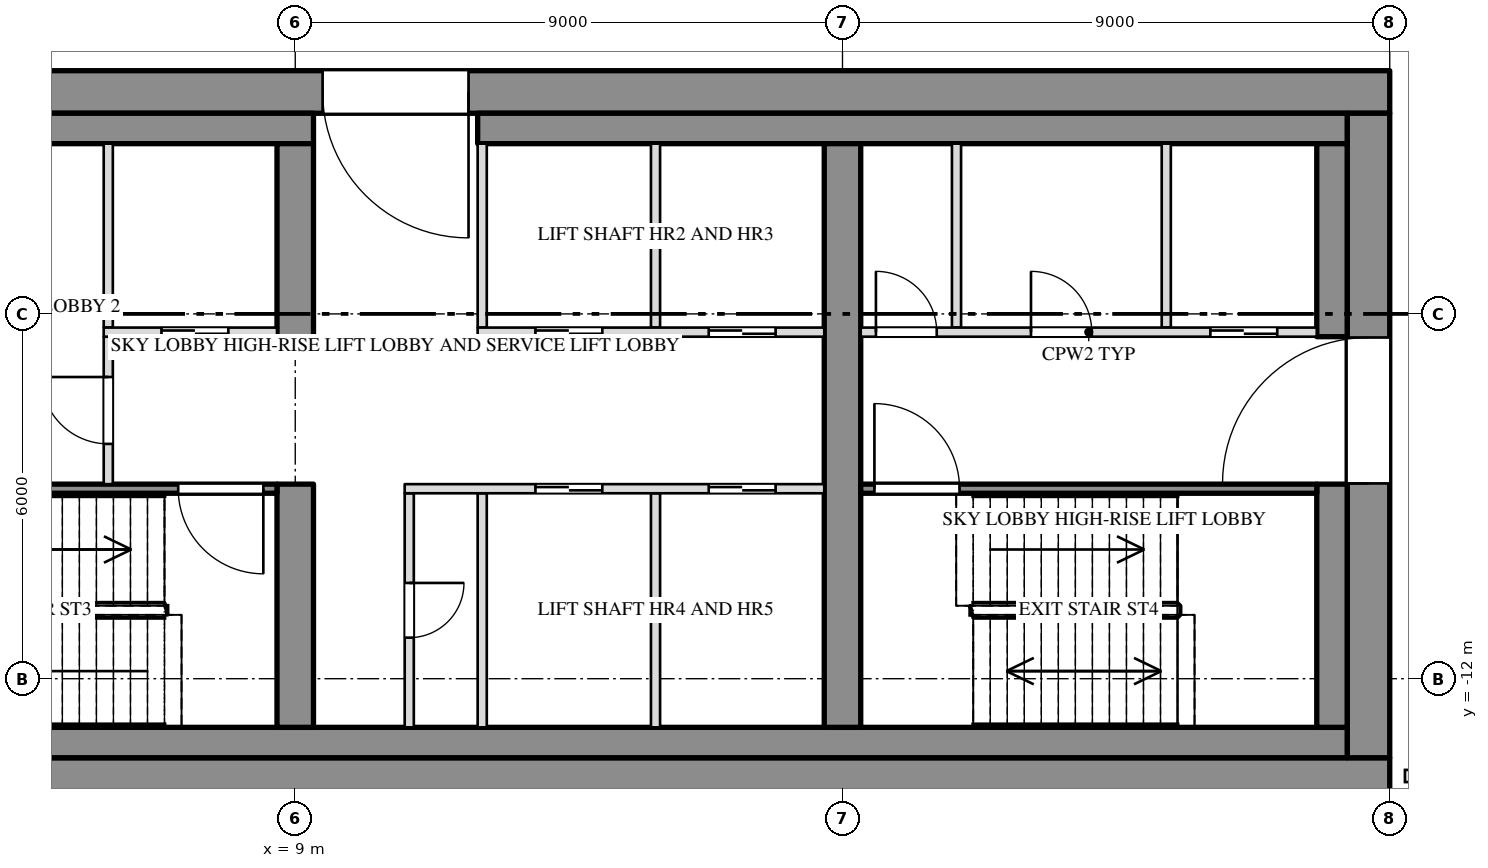
"""IFC4 building model, lengths in metres.
Left out: names, types, materials, properties, quantities, classifications, styles, units other than length and angle.
Written with IfcOpenShell. Run it as: python <this file> out.ifc"""

import sys

from ifc_helpers import new_model, si_unit, direction, frame, frame_2d, origin, place, context, subcontext, project, spatial, rectangle, extrude, element, fill, save


model = new_model("IFC4")
c1 = context("Model", 3, precision=1e-05, world=origin(), true_north=direction((0.0, 1.0)))
c2 = subcontext(c1, "Body", "Model", "MODEL_VIEW")
j1 = project(units=[si_unit("LENGTHUNIT", "METRE"), si_unit("PLANEANGLEUNIT", "RADIAN")], contexts=[c1])
p1 = place(None, origin())
s1 = spatial("IfcSite", under=j1, at=p1, CompositionType="ELEMENT")
p2 = place(p1, origin())
s2 = spatial("IfcBuilding", under=s1, at=p2, CompositionType="ELEMENT")
p3 = place(p2, frame((0.0, 0.0, 264.5)))
s3 = spatial("IfcBuildingStorey", under=s2, at=p3, CompositionType="ELEMENT", Elevation=264.5)
p4 = place(p3, frame((-27.0, -2.35, 0.0), z_axis=(0.0, 0.0, 1.0), x_axis=(1.0, 0.0, 0.0)))
e1 = element("IfcWall", 1, at=p4, inside=s3, PredefinedType="SHEAR", context=c2, shape_type="SweptSolid", body=[
    extrude(rectangle(XDim=54.0, YDim=0.7, at=frame_2d((27.0, 0.0))), origin(), (0.0, 0.0, 1.0), 3.65),
])
p5 = place(p4, frame((15.15, 0.0, 0.0)))
e2 = element("IfcOpeningElement", 2, at=p5, cuts=e1, PredefinedType="OPENING", context=c2, shape_type="SweptSolid", body=[
    extrude(rectangle(XDim=2.4, YDim=2.1, at=frame_2d((1.2, 1.05))), frame((0.0, 0.362, 0.0), z_axis=(0.0, -1.0, 0.0), x_axis=(1.0, 0.0, 0.0)), (0.0, 0.0, 1.0), 0.724),
])
p6 = place(p4, frame((36.45, 0.0, 0.0)))
e3 = element("IfcOpeningElement", 3, at=p6, cuts=e1, PredefinedType="OPENING", context=c2, shape_type="SweptSolid", body=[
    extrude(rectangle(XDim=2.4, YDim=2.1, at=frame_2d((1.2, 1.05))), frame((0.0, 0.362, 0.0), z_axis=(0.0, -1.0, 0.0), x_axis=(1.0, 0.0, 0.0)), (0.0, 0.0, 1.0), 0.724),
])
p7 = place(p3, frame((-27.0, -13.65, 0.0), z_axis=(0.0, 0.0, 1.0), x_axis=(1.0, 0.0, 0.0)))
e4 = element("IfcWall", 4, at=p7, inside=s3, PredefinedType="SHEAR", context=c2, shape_type="SweptSolid", body=[
    extrude(rectangle(XDim=54.0, YDim=0.7, at=frame_2d((27.0, 0.0))), origin(), (0.0, 0.0, 1.0), 3.65),
])
p8 = place(p3, frame((26.65, -13.3, 0.0), z_axis=(0.0, 0.0, 1.0), x_axis=(0.0, 1.0, 0.0)))
e5 = element("IfcWall", 5, at=p8, inside=s3, PredefinedType="SHEAR", context=c2, shape_type="SweptSolid", body=[
    extrude(rectangle(XDim=10.6, YDim=0.7, at=frame_2d((5.3, 0.0))), origin(), (0.0, 0.0, 1.0), 3.65),
])
p9 = place(p8, frame((4.512, 0.0, 0.0)))
e6 = element("IfcOpeningElement", 6, at=p9, cuts=e5, PredefinedType="OPENING", context=c2, shape_type="SweptSolid", body=[
    extrude(rectangle(XDim=2.4, YDim=2.1, at=frame_2d((1.2, 1.05))), frame((0.0, 0.362, 0.0), z_axis=(0.0, -1.0, 0.0), x_axis=(1.0, 0.0, 0.0)), (0.0, 0.0, 1.0), 0.724),
])
p10 = place(p3, frame((-9.3, -2.95, 0.0), z_axis=(0.0, 0.0, 1.0), x_axis=(1.0, 0.0, 0.0)))
e7 = element("IfcWall", 7, at=p10, inside=s3, PredefinedType="SHEAR", context=c2, shape_type="SweptSolid", body=[
    extrude(rectangle(XDim=18.6, YDim=0.5, at=frame_2d((9.3, 0.0))), origin(), (0.0, 0.0, 1.0), 3.65),
])
p11 = place(p3, frame((12.0, -2.95, 0.0), z_axis=(0.0, 0.0, 1.0), x_axis=(1.0, 0.0, 0.0)))
e8 = element("IfcWall", 8, at=p11, inside=s3, PredefinedType="SHEAR", context=c2, shape_type="SweptSolid", body=[
    extrude(rectangle(XDim=14.3, YDim=0.5, at=frame_2d((7.15, 0.0))), origin(), (0.0, 0.0, 1.0), 3.65),
])
p12 = place(p3, frame((-26.3, -13.05, 0.0), z_axis=(0.0, 0.0, 1.0), x_axis=(1.0, 0.0, 0.0)))
e9 = element("IfcWall", 9, at=p12, inside=s3, PredefinedType="SHEAR", context=c2, shape_type="SweptSolid", body=[
    extrude(rectangle(XDim=52.6, YDim=0.5, at=frame_2d((26.3, 0.0))), origin(), (0.0, 0.0, 1.0), 3.65),
])
p13 = place(p3, frame((26.05, -12.8, 0.0), z_axis=(0.0, 0.0, 1.0), x_axis=(0.0, 1.0, 0.0)))
e10 = element("IfcWall", 10, at=p13, inside=s3, PredefinedType="SHEAR", context=c2, shape_type="SweptSolid", body=[
    extrude(rectangle(XDim=4.0, YDim=0.5, at=frame_2d((2.0, 0.0))), origin(), (0.0, 0.0, 1.0), 3.65),
])
p14 = place(p3, frame((26.05, -6.375, 0.0), z_axis=(0.0, 0.0, 1.0), x_axis=(0.0, 1.0, 0.0)))
e11 = element("IfcWall", 11, at=p14, inside=s3, PredefinedType="SHEAR", context=c2, shape_type="SweptSolid", body=[
    extrude(rectangle(XDim=3.175, YDim=0.5, at=frame_2d((1.587, 0.0))), origin(), (0.0, 0.0, 1.0), 3.65),
])
p15 = place(p3, frame((9.0, -12.8, 0.0), z_axis=(0.0, 0.0, 1.0), x_axis=(0.0, 1.0, 0.0)))
e12 = element("IfcWall", 12, at=p15, inside=s3, PredefinedType="SHEAR", context=c2, shape_type="SweptSolid", body=[
    extrude(rectangle(XDim=4.0, YDim=0.6, at=frame_2d((2.0, 0.0))), origin(), (0.0, 0.0, 1.0), 3.65),
])
p16 = place(p3, frame((9.0, -6.375, 0.0), z_axis=(0.0, 0.0, 1.0), x_axis=(0.0, 1.0, 0.0)))
e13 = element("IfcWall", 13, at=p16, inside=s3, PredefinedType="SHEAR", context=c2, shape_type="SweptSolid", body=[
    extrude(rectangle(XDim=3.175, YDim=0.6, at=frame_2d((1.587, 0.0))), origin(), (0.0, 0.0, 1.0), 3.65),
])
p17 = place(p3, frame((18.0, -12.8, 0.0), z_axis=(0.0, 0.0, 1.0), x_axis=(0.0, 1.0, 0.0)))
e14 = element("IfcWall", 14, at=p17, inside=s3, PredefinedType="SHEAR", context=c2, shape_type="SweptSolid", body=[
    extrude(rectangle(XDim=9.6, YDim=0.6, at=frame_2d((4.8, 0.0))), origin(), (0.0, 0.0, 1.0), 3.65),
])
for number, where, z_axis, x_axis in (
    (15, (5.925, -6.225, 0.0), (0.0, 0.0, 1.0), (0.0, 1.0, 0.0)),
    (16, (12.075, -6.225, 0.0), (0.0, 0.0, 1.0), (0.0, 1.0, 0.0)),
    (17, (14.925, -6.225, 0.0), (0.0, 0.0, 1.0), (0.0, 1.0, 0.0)),
    (18, (19.875, -6.225, 0.0), (0.0, 0.0, 1.0), (0.0, 1.0, 0.0)),
    (19, (23.325, -6.225, 0.0), (0.0, 0.0, 1.0), (0.0, 1.0, 0.0)),
):
    element("IfcWall", number, at=place(p3, frame(where, z_axis=z_axis, x_axis=x_axis)), inside=s3, PredefinedType="PARTITIONING", context=c2, shape_type="SweptSolid", body=[
        extrude(rectangle(XDim=3.025, YDim=0.15, at=frame_2d((1.513, 0.0))), origin(), (0.0, 0.0, 1.0), 3.65),
    ])
p18 = place(p3, frame((10.875, -12.8, 0.0), z_axis=(0.0, 0.0, 1.0), x_axis=(0.0, 1.0, 0.0)))
e20 = element("IfcWall", 20, at=p18, inside=s3, PredefinedType="PARTITIONING", context=c2, shape_type="SweptSolid", body=[
    extrude(rectangle(XDim=3.85, YDim=0.15, at=frame_2d((1.925, 0.0))), origin(), (0.0, 0.0, 1.0), 3.65),
])
p19 = place(p18, frame((1.475, 0.0, 0.0)))
e21 = element("IfcOpeningElement", 21, at=p19, cuts=e20, PredefinedType="OPENING", context=c2, shape_type="SweptSolid", body=[
    extrude(rectangle(XDim=0.9, YDim=2.1, at=frame_2d((0.45, 1.05))), frame((0.0, 0.087, 0.0), z_axis=(0.0, -1.0, 0.0), x_axis=(1.0, 0.0, 0.0)), (0.0, 0.0, 1.0), 0.174),
])
for number, where, z_axis, x_axis in (
    (22, (12.075, -12.8, 0.0), (0.0, 0.0, 1.0), (0.0, 1.0, 0.0)),
    (23, (14.925, -12.8, 0.0), (0.0, 0.0, 1.0), (0.0, 1.0, 0.0)),
):
    element("IfcWall", number, at=place(p3, frame(where, z_axis=z_axis, x_axis=x_axis)), inside=s3, PredefinedType="PARTITIONING", context=c2, shape_type="SweptSolid", body=[
        extrude(rectangle(XDim=3.85, YDim=0.15, at=frame_2d((1.925, 0.0))), origin(), (0.0, 0.0, 1.0), 3.65),
    ])
p20 = place(p3, frame((5.925, -8.8, 0.0), z_axis=(0.0, 0.0, 1.0), x_axis=(0.0, 1.0, 0.0)))
e24 = element("IfcWall", 24, at=p20, inside=s3, PredefinedType="PARTITIONING", context=c2, shape_type="SweptSolid", body=[
    extrude(rectangle(XDim=2.425, YDim=0.15, at=frame_2d((1.212, 0.0))), origin(), (0.0, 0.0, 1.0), 3.65),
])
p21 = place(p20, frame((0.662, 0.0, 0.0)))
e25 = element("IfcOpeningElement", 25, at=p21, cuts=e24, PredefinedType="OPENING", context=c2, shape_type="SweptSolid", body=[
    extrude(rectangle(XDim=1.1, YDim=2.1, at=frame_2d((0.55, 1.05))), frame((0.0, 0.087, 0.0), z_axis=(0.0, -1.0, 0.0), x_axis=(1.0, 0.0, 0.0)), (0.0, 0.0, 1.0), 0.174),
])
p22 = place(p3, frame((5.85, -6.3, 0.0), z_axis=(0.0, 0.0, 1.0), x_axis=(1.0, 0.0, 0.0)))
e26 = element("IfcWall", 26, at=p22, inside=s3, PredefinedType="PARTITIONING", context=c2, shape_type="SweptSolid", body=[
    extrude(rectangle(XDim=2.85, YDim=0.15, at=frame_2d((1.425, 0.0))), origin(), (0.0, 0.0, 1.0), 3.65),
])
p23 = place(p22, frame((0.95, 0.0, 0.0)))
e27 = element("IfcOpeningElement", 27, at=p23, cuts=e26, PredefinedType="OPENING", context=c2, shape_type="SweptSolid", body=[
    extrude(rectangle(XDim=1.1, YDim=2.1, at=frame_2d((0.55, 1.05))), frame((0.0, 0.087, 0.0), z_axis=(0.0, -1.0, 0.0), x_axis=(1.0, 0.0, 0.0)), (0.0, 0.0, 1.0), 0.174),
])
p24 = place(p3, frame((12.0, -6.3, 0.0), z_axis=(0.0, 0.0, 1.0), x_axis=(1.0, 0.0, 0.0)))
e28 = element("IfcWall", 28, at=p24, inside=s3, PredefinedType="PARTITIONING", context=c2, shape_type="SweptSolid", body=[
    extrude(rectangle(XDim=5.7, YDim=0.15, at=frame_2d((2.85, 0.0))), origin(), (0.0, 0.0, 1.0), 3.65),
])
p25 = place(p24, frame((0.95, 0.0, 0.0)))
e29 = element("IfcOpeningElement", 29, at=p25, cuts=e28, PredefinedType="OPENING", context=c2, shape_type="SweptSolid", body=[
    extrude(rectangle(XDim=1.1, YDim=2.1, at=frame_2d((0.55, 1.05))), frame((0.0, 0.087, 0.0), z_axis=(0.0, -1.0, 0.0), x_axis=(1.0, 0.0, 0.0)), (0.0, 0.0, 1.0), 0.174),
])
p26 = place(p24, frame((3.8, 0.0, 0.0)))
e30 = element("IfcOpeningElement", 30, at=p26, cuts=e28, PredefinedType="OPENING", context=c2, shape_type="SweptSolid", body=[
    extrude(rectangle(XDim=1.1, YDim=2.1, at=frame_2d((0.55, 1.05))), frame((0.0, 0.087, 0.0), z_axis=(0.0, -1.0, 0.0), x_axis=(1.0, 0.0, 0.0)), (0.0, 0.0, 1.0), 0.174),
])
p27 = place(p3, frame((18.3, -6.3, 0.0), z_axis=(0.0, 0.0, 1.0), x_axis=(1.0, 0.0, 0.0)))
e31 = element("IfcWall", 31, at=p27, inside=s3, PredefinedType="PARTITIONING", context=c2, shape_type="SweptSolid", body=[
    extrude(rectangle(XDim=7.5, YDim=0.15, at=frame_2d((3.75, 0.0))), origin(), (0.0, 0.0, 1.0), 3.65),
])
p28 = place(p27, frame((0.25, 0.0, 0.0)))
e32 = element("IfcOpeningElement", 32, at=p28, cuts=e31, PredefinedType="OPENING", context=c2, shape_type="SweptSolid", body=[
    extrude(rectangle(XDim=1.0, YDim=2.1, at=frame_2d((0.5, 1.05))), frame((0.0, 0.087, 0.0), z_axis=(0.0, -1.0, 0.0), x_axis=(1.0, 0.0, 0.0)), (0.0, 0.0, 1.0), 0.174),
])
p29 = place(p27, frame((2.8, 0.0, 0.0)))
e33 = element("IfcOpeningElement", 33, at=p29, cuts=e31, PredefinedType="OPENING", context=c2, shape_type="SweptSolid", body=[
    extrude(rectangle(XDim=1.0, YDim=2.1, at=frame_2d((0.5, 1.05))), frame((0.0, 0.087, 0.0), z_axis=(0.0, -1.0, 0.0), x_axis=(1.0, 0.0, 0.0)), (0.0, 0.0, 1.0), 0.174),
])
p30 = place(p27, frame((5.75, 0.0, 0.0)))
e34 = element("IfcOpeningElement", 34, at=p30, cuts=e31, PredefinedType="OPENING", context=c2, shape_type="SweptSolid", body=[
    extrude(rectangle(XDim=1.1, YDim=2.1, at=frame_2d((0.55, 1.05))), frame((0.0, 0.087, 0.0), z_axis=(0.0, -1.0, 0.0), x_axis=(1.0, 0.0, 0.0)), (0.0, 0.0, 1.0), 0.174),
])
p31 = place(p3, frame((0.3, -8.875, 0.0), z_axis=(0.0, 0.0, 1.0), x_axis=(1.0, 0.0, 0.0)))
e35 = element("IfcWall", 35, at=p31, inside=s3, PredefinedType="SHEAR", context=c2, shape_type="SweptSolid", body=[
    extrude(rectangle(XDim=8.4, YDim=0.15, at=frame_2d((4.2, 0.0))), origin(), (0.0, 0.0, 1.0), 3.65),
])
p32 = place(p31, frame((6.775, 0.0, 0.0)))
e36 = element("IfcOpeningElement", 36, at=p32, cuts=e35, PredefinedType="OPENING", context=c2, shape_type="SweptSolid", body=[
    extrude(rectangle(XDim=1.4, YDim=2.1, at=frame_2d((0.7, 1.05))), frame((0.0, 0.087, 0.0), z_axis=(0.0, -1.0, 0.0), x_axis=(1.0, 0.0, 0.0)), (0.0, 0.0, 1.0), 0.174),
])
p33 = place(p3, frame((10.8, -8.875, 0.0), z_axis=(0.0, 0.0, 1.0), x_axis=(1.0, 0.0, 0.0)))
e37 = element("IfcWall", 37, at=p33, inside=s3, PredefinedType="PARTITIONING", context=c2, shape_type="SweptSolid", body=[
    extrude(rectangle(XDim=6.9, YDim=0.15, at=frame_2d((3.45, 0.0))), origin(), (0.0, 0.0, 1.0), 3.65),
])
p34 = place(p33, frame((2.15, 0.0, 0.0)))
e38 = element("IfcOpeningElement", 38, at=p34, cuts=e37, PredefinedType="OPENING", context=c2, shape_type="SweptSolid", body=[
    extrude(rectangle(XDim=1.1, YDim=2.1, at=frame_2d((0.55, 1.05))), frame((0.0, 0.087, 0.0), z_axis=(0.0, -1.0, 0.0), x_axis=(1.0, 0.0, 0.0)), (0.0, 0.0, 1.0), 0.174),
])
p35 = place(p33, frame((5.0, 0.0, 0.0)))
e39 = element("IfcOpeningElement", 39, at=p35, cuts=e37, PredefinedType="OPENING", context=c2, shape_type="SweptSolid", body=[
    extrude(rectangle(XDim=1.1, YDim=2.1, at=frame_2d((0.55, 1.05))), frame((0.0, 0.087, 0.0), z_axis=(0.0, -1.0, 0.0), x_axis=(1.0, 0.0, 0.0)), (0.0, 0.0, 1.0), 0.174),
])
p36 = place(p3, frame((18.3, -8.875, 0.0), z_axis=(0.0, 0.0, 1.0), x_axis=(1.0, 0.0, 0.0)))
e40 = element("IfcWall", 40, at=p36, inside=s3, PredefinedType="SHEAR", context=c2, shape_type="SweptSolid", body=[
    extrude(rectangle(XDim=7.5, YDim=0.15, at=frame_2d((3.75, 0.0))), origin(), (0.0, 0.0, 1.0), 3.65),
])
p37 = place(p36, frame((0.225, 0.0, 0.0)))
e41 = element("IfcOpeningElement", 41, at=p37, cuts=e40, PredefinedType="OPENING", context=c2, shape_type="SweptSolid", body=[
    extrude(rectangle(XDim=1.4, YDim=2.1, at=frame_2d((0.7, 1.05))), frame((0.0, 0.087, 0.0), z_axis=(0.0, -1.0, 0.0), x_axis=(1.0, 0.0, 0.0)), (0.0, 0.0, 1.0), 0.174),
])
p38 = place(p21, origin())
e42 = element("IfcDoor", 42, at=p38, inside=s3, OperationType="SINGLE_SWING_RIGHT", PredefinedType="DOOR", context=c2, shape_type="SweptSolid", body=[
    extrude(rectangle(XDim=1.1, YDim=2.1, at=frame_2d((0.55, 1.05))), frame((0.0, 0.025, 0.0), z_axis=(0.0, -1.0, 0.0), x_axis=(1.0, 0.0, 0.0)), (0.0, 0.0, 1.0), 0.05),
])
fill(e25, e42)
p39 = place(p23, origin())
e43 = element("IfcDoor", 43, at=p39, inside=s3, OperationType="SLIDING_TO_RIGHT", PredefinedType="DOOR", context=c2, shape_type="SweptSolid", body=[
    extrude(rectangle(XDim=1.1, YDim=2.1, at=frame_2d((0.55, 1.05))), frame((0.0, 0.025, 0.0), z_axis=(0.0, -1.0, 0.0), x_axis=(1.0, 0.0, 0.0)), (0.0, 0.0, 1.0), 0.05),
])
fill(e27, e43)
p40 = place(p32, origin())
e44 = element("IfcDoor", 44, at=p40, inside=s3, OperationType="DOUBLE_DOOR_SINGLE_SWING", PredefinedType="DOOR", context=c2, shape_type="SweptSolid", body=[
    extrude(rectangle(XDim=1.4, YDim=2.1, at=frame_2d((0.7, 1.05))), frame((0.0, 0.025, 0.0), z_axis=(0.0, -1.0, 0.0), x_axis=(1.0, 0.0, 0.0)), (0.0, 0.0, 1.0), 0.05),
])
fill(e36, e44)
p41 = place(p6, origin())
e45 = element("IfcDoor", 45, at=p41, inside=s3, OperationType="DOUBLE_DOOR_SINGLE_SWING", PredefinedType="DOOR", context=c2, shape_type="SweptSolid", body=[
    extrude(rectangle(XDim=2.4, YDim=2.1, at=frame_2d((1.2, 1.05))), frame((0.0, 0.025, 0.0), z_axis=(0.0, -1.0, 0.0), x_axis=(1.0, 0.0, 0.0)), (0.0, 0.0, 1.0), 0.05),
])
fill(e3, e45)
p42 = place(p19, origin())
e46 = element("IfcDoor", 46, at=p42, inside=s3, OperationType="SINGLE_SWING_LEFT", PredefinedType="DOOR", context=c2, shape_type="SweptSolid", body=[
    extrude(rectangle(XDim=0.9, YDim=2.1, at=frame_2d((0.45, 1.05))), frame((0.0, 0.025, 0.0), z_axis=(0.0, -1.0, 0.0), x_axis=(1.0, 0.0, 0.0)), (0.0, 0.0, 1.0), 0.05),
])
fill(e21, e46)
p43 = place(p34, origin())
e47 = element("IfcDoor", 47, at=p43, inside=s3, OperationType="SLIDING_TO_RIGHT", PredefinedType="DOOR", context=c2, shape_type="SweptSolid", body=[
    extrude(rectangle(XDim=1.1, YDim=2.1, at=frame_2d((0.55, 1.05))), frame((0.0, 0.025, 0.0), z_axis=(0.0, -1.0, 0.0), x_axis=(1.0, 0.0, 0.0)), (0.0, 0.0, 1.0), 0.05),
])
fill(e38, e47)
p44 = place(p25, origin())
e48 = element("IfcDoor", 48, at=p44, inside=s3, OperationType="SLIDING_TO_LEFT", PredefinedType="DOOR", context=c2, shape_type="SweptSolid", body=[
    extrude(rectangle(XDim=1.1, YDim=2.1, at=frame_2d((0.55, 1.05))), frame((0.0, 0.025, 0.0), z_axis=(0.0, -1.0, 0.0), x_axis=(1.0, 0.0, 0.0)), (0.0, 0.0, 1.0), 0.05),
])
fill(e29, e48)
p45 = place(p35, origin())
e49 = element("IfcDoor", 49, at=p45, inside=s3, OperationType="SLIDING_TO_RIGHT", PredefinedType="DOOR", context=c2, shape_type="SweptSolid", body=[
    extrude(rectangle(XDim=1.1, YDim=2.1, at=frame_2d((0.55, 1.05))), frame((0.0, 0.025, 0.0), z_axis=(0.0, -1.0, 0.0), x_axis=(1.0, 0.0, 0.0)), (0.0, 0.0, 1.0), 0.05),
])
fill(e39, e49)
p46 = place(p26, origin())
e50 = element("IfcDoor", 50, at=p46, inside=s3, OperationType="SLIDING_TO_LEFT", PredefinedType="DOOR", context=c2, shape_type="SweptSolid", body=[
    extrude(rectangle(XDim=1.1, YDim=2.1, at=frame_2d((0.55, 1.05))), frame((0.0, 0.025, 0.0), z_axis=(0.0, -1.0, 0.0), x_axis=(1.0, 0.0, 0.0)), (0.0, 0.0, 1.0), 0.05),
])
fill(e30, e50)
p47 = place(p28, origin())
e51 = element("IfcDoor", 51, at=p47, inside=s3, OperationType="SINGLE_SWING_LEFT", PredefinedType="DOOR", context=c2, shape_type="SweptSolid", body=[
    extrude(rectangle(XDim=1.0, YDim=2.1, at=frame_2d((0.5, 1.05))), frame((0.0, 0.025, 0.0), z_axis=(0.0, -1.0, 0.0), x_axis=(1.0, 0.0, 0.0)), (0.0, 0.0, 1.0), 0.05),
])
fill(e32, e51)
p48 = place(p37, origin())
e52 = element("IfcDoor", 52, at=p48, inside=s3, OperationType="DOUBLE_DOOR_SINGLE_SWING", PredefinedType="DOOR", context=c2, shape_type="SweptSolid", body=[
    extrude(rectangle(XDim=1.4, YDim=2.1, at=frame_2d((0.7, 1.05))), frame((0.0, 0.025, 0.0), z_axis=(0.0, -1.0, 0.0), x_axis=(1.0, 0.0, 0.0)), (0.0, 0.0, 1.0), 0.05),
])
fill(e41, e52)
p49 = place(p29, origin())
e53 = element("IfcDoor", 53, at=p49, inside=s3, OperationType="SINGLE_SWING_LEFT", PredefinedType="DOOR", context=c2, shape_type="SweptSolid", body=[
    extrude(rectangle(XDim=1.0, YDim=2.1, at=frame_2d((0.5, 1.05))), frame((0.0, 0.025, 0.0), z_axis=(0.0, -1.0, 0.0), x_axis=(1.0, 0.0, 0.0)), (0.0, 0.0, 1.0), 0.05),
])
fill(e33, e53)
p50 = place(p30, origin())
e54 = element("IfcDoor", 54, at=p50, inside=s3, OperationType="SLIDING_TO_LEFT", PredefinedType="DOOR", context=c2, shape_type="SweptSolid", body=[
    extrude(rectangle(XDim=1.1, YDim=2.1, at=frame_2d((0.55, 1.05))), frame((0.0, 0.025, 0.0), z_axis=(0.0, -1.0, 0.0), x_axis=(1.0, 0.0, 0.0)), (0.0, 0.0, 1.0), 0.05),
])
fill(e34, e54)
p51 = place(p9, origin())
e55 = element("IfcDoor", 55, at=p51, inside=s3, OperationType="DOUBLE_DOOR_SINGLE_SWING", PredefinedType="DOOR", context=c2, shape_type="SweptSolid", body=[
    extrude(rectangle(XDim=2.4, YDim=2.1, at=frame_2d((1.2, 1.05))), frame((0.0, 0.025, 0.0), z_axis=(0.0, -1.0, 0.0), x_axis=(1.0, 0.0, 0.0)), (0.0, 0.0, 1.0), 0.05),
])
fill(e6, e55)
save(model, sys.argv[1])
